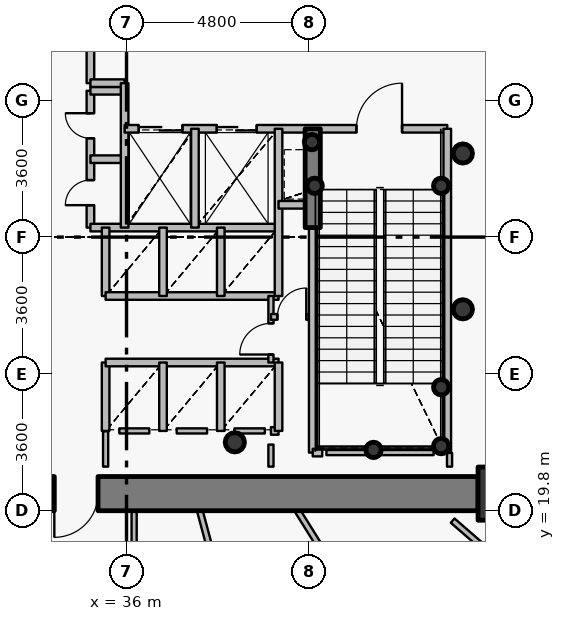
"""IFC4 building model, lengths in metres.
Left out: names, types, materials, properties, quantities, classifications, styles, units other than length and angle.
Written with IfcOpenShell. Run it as: python <this file> out.ifc"""

import sys

from ifc_helpers import new_model, si_unit, direction, frame, frame_2d, origin, origin_2d, place, context, subcontext, project, spatial, rectangle, hollow_circle, extrude, source, transform, mapped, element, fill, save


model = new_model("IFC4")
c1 = context("Model", 3, precision=1e-05, world=origin(), true_north=direction((0.0, 1.0)))
c2 = subcontext(c1, "Body", "Model", "MODEL_VIEW")
j1 = project(units=[si_unit("LENGTHUNIT", "METRE"), si_unit("PLANEANGLEUNIT", "RADIAN")], contexts=[c1])
p1 = place(None, origin())
s1 = spatial("IfcSite", under=j1, at=p1, CompositionType="ELEMENT")
p2 = place(p1, origin())
s2 = spatial("IfcBuilding", under=s1, at=p2, CompositionType="ELEMENT")
p3 = place(p2, frame((0.0, 0.0, 27.0)))
s3 = spatial("IfcBuildingStorey", under=s2, at=p3, CompositionType="ELEMENT", Elevation=27.0)
p4 = place(p3, frame((45.95, 20.25, 0.0), z_axis=(0.0, 0.0, 1.0), x_axis=(1.0, 0.0, 0.0)))
e1 = element("IfcColumn", 1, at=p4, inside=s3, PredefinedType="COLUMN", context=c2, shape_type="SweptSolid", body=[
    extrude(rectangle(XDim=1.4, YDim=1.4, at=origin_2d()), origin(), (0.0, 0.0, 1.0), 5.4),
])
p5 = place(p3, frame((38.85, 21.6, 0.0), z_axis=(0.0, 0.0, 1.0), x_axis=(1.0, 0.0, 0.0)))
e2 = element("IfcColumn", 2, at=p5, inside=s3, PredefinedType="COLUMN", context=c2, shape_type="SweptSolid", body=[
    extrude(hollow_circle(Radius=0.254, WallThickness=0.02, at=origin_2d()), origin(), (0.0, 0.0, 1.0), 5.4),
])
for number, where, z_axis, x_axis in (
    (3, (44.28, 21.5, 0.0), (0.0, 0.0, 1.0), (1.0, 0.0, 0.0)),
    (4, (44.28, 23.05, 0.0), (0.0, 0.0, 1.0), (1.0, 0.0, 0.0)),
    (5, (42.5, 21.4, 0.0), (0.0, 0.0, 1.0), (1.0, 0.0, 0.0)),
    (6, (40.95, 28.35, 0.0), (0.0, 0.0, 1.0), (1.0, 0.0, 0.0)),
    (7, (44.28, 28.35, 0.0), (0.0, 0.0, 1.0), (1.0, 0.0, 0.0)),
    (8, (40.88, 29.5, 0.0), (0.0, 0.0, 1.0), (1.0, 0.0, 0.0)),
):
    element("IfcColumn", number, at=place(p3, frame(where, z_axis=z_axis, x_axis=x_axis)), inside=s3, PredefinedType="COLUMN", context=c2, shape_type="SweptSolid", body=[
        extrude(hollow_circle(Radius=0.203, WallThickness=0.016, at=origin_2d()), origin(), (0.0, 0.0, 1.0), 5.4),
    ])
p6 = place(p3, frame((45.25, 20.25, 0.0), z_axis=(0.0, 0.0, 1.0), x_axis=(-1.0, 0.0, 0.0)))
e9 = element("IfcWall", 9, at=p6, inside=s3, PredefinedType="SHEAR", context=c2, shape_type="SweptSolid", body=[
    extrude(rectangle(XDim=18.5, YDim=0.9, at=frame_2d((9.25, 0.0))), origin(), (0.0, 0.0, 1.0), 4.6),
])
p7 = place(p6, frame((10.0, 0.0, 0.0)))
e10 = element("IfcOpeningElement", 10, at=p7, cuts=e9, PredefinedType="OPENING", context=c2, shape_type="SweptSolid", body=[
    extrude(rectangle(XDim=1.15, YDim=2.15, at=origin_2d()), frame((0.575, 0.46, 1.075), z_axis=(0.0, -1.0, 0.0), x_axis=(1.0, 0.0, 0.0)), (0.0, 0.0, 1.0), 0.92),
])
p8 = place(p3, frame((40.9, 27.25, 0.0), z_axis=(0.0, 0.0, 1.0), x_axis=(0.0, 1.0, 0.0)))
e11 = element("IfcWall", 11, at=p8, inside=s3, PredefinedType="SHEAR", context=c2, shape_type="SweptSolid", body=[
    extrude(rectangle(XDim=2.6, YDim=0.4, at=frame_2d((1.3, 0.0))), origin(), (0.0, 0.0, 1.0), 4.75),
])
for number, where, z_axis, x_axis in (
    (12, (44.85, 25.1, 0.0), (0.0, 0.0, 1.0), (1.0, 0.0, 0.0)),
    (13, (44.85, 29.2, 0.0), (0.0, 0.0, 1.0), (1.0, 0.0, 0.0)),
):
    element("IfcColumn", number, at=place(p3, frame(where, z_axis=z_axis, x_axis=x_axis)), inside=s3, PredefinedType="COLUMN", context=c2, shape_type="SweptSolid", body=[
        extrude(hollow_circle(Radius=0.254, WallThickness=0.02, at=origin_2d()), origin(), (0.0, 0.0, 1.0), 5.4),
    ])
p9 = place(p3, frame((35.05, 27.25, 0.0), z_axis=(0.0, 0.0, 1.0), x_axis=(0.0, 1.0, 0.0)))
e14 = element("IfcWall", 14, at=p9, inside=s3, PredefinedType="PARTITIONING", context=c2, shape_type="SweptSolid", body=[
    extrude(rectangle(XDim=3.6, YDim=0.2, at=frame_2d((1.8, 0.0))), origin(), (0.0, 0.0, 1.0), 5.15),
])
p10 = place(p9, frame((0.59, 0.0, 0.0)))
e15 = element("IfcOpeningElement", 15, at=p10, cuts=e14, PredefinedType="OPENING", context=c2, shape_type="SweptSolid", body=[
    extrude(rectangle(XDim=0.66, YDim=2.05, at=origin_2d()), frame((0.33, 0.11, 1.025), z_axis=(0.0, -1.0, 0.0), x_axis=(1.0, 0.0, 0.0)), (0.0, 0.0, 1.0), 0.22),
])
p11 = place(p9, frame((2.35, 0.0, 0.0)))
e16 = element("IfcOpeningElement", 16, at=p11, cuts=e14, PredefinedType="OPENING", context=c2, shape_type="SweptSolid", body=[
    extrude(rectangle(XDim=0.66, YDim=2.05, at=origin_2d()), frame((0.33, 0.11, 1.025), z_axis=(0.0, -1.0, 0.0), x_axis=(1.0, 0.0, 0.0)), (0.0, 0.0, 1.0), 0.22),
])
p12 = place(p3, frame((35.05, 27.25, 0.0), z_axis=(0.0, 0.0, 1.0), x_axis=(1.0, 0.0, 0.0)))
e17 = element("IfcWall", 17, at=p12, inside=s3, PredefinedType="PARTITIONING", context=c2, shape_type="SweptSolid", body=[
    extrude(rectangle(XDim=4.95, YDim=0.2, at=frame_2d((2.475, 0.0))), origin(), (0.0, 0.0, 1.0), 4.735),
])
for number, where, z_axis, x_axis in (
    (18, (35.05, 29.05, 0.0), (0.0, 0.0, 1.0), (1.0, 0.0, 0.0)),
    (19, (35.05, 30.85, 0.0), (0.0, 0.0, 1.0), (1.0, 0.0, 0.0)),
):
    element("IfcWall", number, at=place(p3, frame(where, z_axis=z_axis, x_axis=x_axis)), inside=s3, PredefinedType="PARTITIONING", context=c2, shape_type="SweptSolid", body=[
        extrude(rectangle(XDim=0.9, YDim=0.2, at=frame_2d((0.45, 0.0))), origin(), (0.0, 0.0, 1.0), 5.15),
    ])
p13 = place(p3, frame((35.05, 31.05, 0.0), z_axis=(0.0, 0.0, 1.0), x_axis=(0.0, 1.0, 0.0)))
e20 = element("IfcWall", 20, at=p13, inside=s3, PredefinedType="PARTITIONING", context=c2, shape_type="SweptSolid", body=[
    extrude(rectangle(XDim=2.25, YDim=0.2, at=frame_2d((1.125, 0.0))), origin(), (0.0, 0.0, 1.0), 4.735),
])
p14 = place(p3, frame((35.05, 31.05, 0.0), z_axis=(0.0, 0.0, 1.0), x_axis=(1.0, 0.0, 0.0)))
e21 = element("IfcWall", 21, at=p14, inside=s3, PredefinedType="PARTITIONING", context=c2, shape_type="SweptSolid", body=[
    extrude(rectangle(XDim=0.9, YDim=0.2, at=frame_2d((0.45, 0.0))), origin(), (0.0, 0.0, 1.0), 5.15),
])
p15 = place(p3, frame((35.45, 21.9, 0.0), z_axis=(0.0, 0.0, 1.0), x_axis=(0.0, 1.0, 0.0)))
e22 = element("IfcWall", 22, at=p15, inside=s3, PredefinedType="PARTITIONING", context=c2, shape_type="SweptSolid", body=[
    extrude(rectangle(XDim=1.8, YDim=0.2, at=frame_2d((0.9, 0.0))), origin(), (0.0, 0.0, 1.0), 5.15),
])
p16 = place(p3, frame((35.45, 23.7, 0.0), z_axis=(0.0, 0.0, 1.0), x_axis=(1.0, 0.0, 0.0)))
e23 = element("IfcWall", 23, at=p16, inside=s3, PredefinedType="PARTITIONING", context=c2, shape_type="SweptSolid", body=[
    extrude(rectangle(XDim=4.55, YDim=0.2, at=frame_2d((2.275, 0.0))), origin(), (0.0, 0.0, 1.0), 4.735),
])
p17 = place(p3, frame((35.45, 25.45, 0.0), z_axis=(0.0, 0.0, 1.0), x_axis=(0.0, 1.0, 0.0)))
e24 = element("IfcWall", 24, at=p17, inside=s3, PredefinedType="PARTITIONING", context=c2, shape_type="SweptSolid", body=[
    extrude(rectangle(XDim=1.8, YDim=0.2, at=frame_2d((0.9, 0.0))), origin(), (0.0, 0.0, 1.0), 5.15),
])
p18 = place(p3, frame((35.45, 25.45, 0.0), z_axis=(0.0, 0.0, 1.0), x_axis=(1.0, 0.0, 0.0)))
e25 = element("IfcWall", 25, at=p18, inside=s3, PredefinedType="PARTITIONING", context=c2, shape_type="SweptSolid", body=[
    extrude(rectangle(XDim=4.55, YDim=0.2, at=frame_2d((2.275, 0.0))), origin(), (0.0, 0.0, 1.0), 4.735),
])
p19 = place(p3, frame((35.95, 27.25, 0.0), z_axis=(0.0, 0.0, 1.0), x_axis=(0.0, 1.0, 0.0)))
e26 = element("IfcWall", 26, at=p19, inside=s3, PredefinedType="PARTITIONING", context=c2, shape_type="SweptSolid", body=[
    extrude(rectangle(XDim=3.8, YDim=0.2, at=frame_2d((1.9, 0.0))), origin(), (0.0, 0.0, 1.0), 5.15),
])
p20 = place(p3, frame((35.95, 29.85, 0.0), z_axis=(0.0, 0.0, 1.0), x_axis=(1.0, 0.0, 0.0)))
e27 = element("IfcWall", 27, at=p20, inside=s3, PredefinedType="PARTITIONING", context=c2, shape_type="SweptSolid", body=[
    extrude(rectangle(XDim=8.49, YDim=0.2, at=frame_2d((4.245, 0.0))), origin(), (0.0, 0.0, 1.0), 4.735),
])
p21 = place(p20, frame((6.1, 0.0, 0.0)))
e28 = element("IfcOpeningElement", 28, at=p21, cuts=e27, PredefinedType="OPENING", context=c2, shape_type="SweptSolid", body=[
    extrude(rectangle(XDim=1.2, YDim=2.15, at=origin_2d()), frame((0.6, 0.11, 1.075), z_axis=(0.0, -1.0, 0.0), x_axis=(1.0, 0.0, 0.0)), (0.0, 0.0, 1.0), 0.22),
])
p22 = place(p20, frame((0.37, 0.0, 0.0)))
e29 = element("IfcOpeningElement", 29, at=p22, cuts=e27, PredefinedType="OPENING", context=c2, shape_type="SweptSolid", body=[
    extrude(rectangle(XDim=1.15, YDim=2.15, at=origin_2d()), frame((0.575, 0.11, 1.075), z_axis=(0.0, -1.0, 0.0), x_axis=(1.0, 0.0, 0.0)), (0.0, 0.0, 1.0), 0.22),
])
p23 = place(p20, frame((2.425, 0.0, 0.0)))
e30 = element("IfcOpeningElement", 30, at=p23, cuts=e27, PredefinedType="OPENING", context=c2, shape_type="SweptSolid", body=[
    extrude(rectangle(XDim=1.05, YDim=2.15, at=origin_2d()), frame((0.525, 0.11, 1.075), z_axis=(0.0, -1.0, 0.0), x_axis=(1.0, 0.0, 0.0)), (0.0, 0.0, 1.0), 0.22),
])
p24 = place(p3, frame((36.2, 17.9, 0.0), z_axis=(0.0, 0.0, 1.0), x_axis=(0.0, 1.0, 0.0)))
e31 = element("IfcWall", 31, at=p24, inside=s3, PredefinedType="PARTITIONING", context=c2, shape_type="SweptSolid", body=[
    extrude(rectangle(XDim=1.9, YDim=0.135, at=frame_2d((0.95, 0.0))), origin(), (0.0, 0.0, 1.0), 3.185),
])
for number, where, z_axis, x_axis in (
    (32, (36.96, 21.9, 0.0), (0.0, 0.0, 1.0), (0.0, 1.0, 0.0)),
    (33, (36.96, 25.45, 0.0), (0.0, 0.0, 1.0), (0.0, 1.0, 0.0)),
):
    element("IfcWall", number, at=place(p3, frame(where, z_axis=z_axis, x_axis=x_axis)), inside=s3, PredefinedType="PARTITIONING", context=c2, shape_type="SweptSolid", body=[
        extrude(rectangle(XDim=1.8, YDim=0.2, at=frame_2d((0.9, 0.0))), origin(), (0.0, 0.0, 1.0), 5.15),
    ])
p25 = place(p3, frame((37.8, 27.25, 0.0), z_axis=(0.0, 0.0, 1.0), x_axis=(0.0, 1.0, 0.0)))
e34 = element("IfcWall", 34, at=p25, inside=s3, PredefinedType="PARTITIONING", context=c2, shape_type="SweptSolid", body=[
    extrude(rectangle(XDim=2.6, YDim=0.2, at=frame_2d((1.3, 0.0))), origin(), (0.0, 0.0, 1.0), 5.15),
])
p26 = place(p3, frame((37.929, 19.8, 0.0), z_axis=(0.0, 0.0, 1.0), x_axis=(0.258828999451, -0.965923158974, 0.0)))
e35 = element("IfcWall", 35, at=p26, inside=s3, PredefinedType="PARTITIONING", context=c2, shape_type="SweptSolid", body=[
    extrude(rectangle(XDim=11.645, YDim=0.15, at=frame_2d((5.823, 0.0))), origin(), (0.0, 0.0, 1.0), 4.635),
])
p27 = place(p26, frame((2.36, 0.0, 0.0)))
e36 = element("IfcOpeningElement", 36, at=p27, cuts=e35, PredefinedType="OPENING", context=c2, shape_type="SweptSolid", body=[
    extrude(rectangle(XDim=0.82, YDim=2.1, at=origin_2d()), frame((0.41, 0.085, 1.05), z_axis=(0.0, -1.0, 0.0), x_axis=(1.0, 0.0, 0.0)), (0.0, 0.0, 1.0), 0.17),
])
p28 = place(p26, frame((8.028, 0.0, 0.0)))
e37 = element("IfcOpeningElement", 37, at=p28, cuts=e35, PredefinedType="OPENING", context=c2, shape_type="SweptSolid", body=[
    extrude(rectangle(XDim=1.05, YDim=2.15, at=origin_2d()), frame((0.525, 0.085, 1.075), z_axis=(0.0, -1.0, 0.0), x_axis=(1.0, 0.0, 0.0)), (0.0, 0.0, 1.0), 0.17),
])
for number, where, z_axis, x_axis in (
    (38, (38.48, 21.9, 0.0), (0.0, 0.0, 1.0), (0.0, 1.0, 0.0)),
    (39, (38.48, 25.45, 0.0), (0.0, 0.0, 1.0), (0.0, 1.0, 0.0)),
):
    element("IfcWall", number, at=place(p3, frame(where, z_axis=z_axis, x_axis=x_axis)), inside=s3, PredefinedType="PARTITIONING", context=c2, shape_type="SweptSolid", body=[
        extrude(rectangle(XDim=1.8, YDim=0.2, at=frame_2d((0.9, 0.0))), origin(), (0.0, 0.0, 1.0), 5.15),
    ])
p29 = place(p3, frame((39.8, 21.9, 0.0), z_axis=(0.0, 0.0, 1.0), x_axis=(1.0, 0.0, 0.0)))
e40 = element("IfcWall", 40, at=p29, inside=s3, PredefinedType="PARTITIONING", context=c2, shape_type="SweptSolid", body=[
    extrude(rectangle(XDim=0.2, YDim=0.2, at=frame_2d((0.1, 0.0))), origin(), (0.0, 0.0, 1.0), 5.15),
])
p30 = place(p3, frame((39.8, 23.7, 0.0), z_axis=(0.0, 0.0, 1.0), x_axis=(0.0, 1.0, 0.0)))
e41 = element("IfcWall", 41, at=p30, inside=s3, PredefinedType="PARTITIONING", context=c2, shape_type="SweptSolid", body=[
    extrude(rectangle(XDim=1.75, YDim=0.135, at=frame_2d((0.875, 0.0))), origin(), (0.0, 0.0, 1.0), 5.15),
])
p31 = place(p30, frame((0.21, 0.0, 0.0)))
e42 = element("IfcOpeningElement", 42, at=p31, cuts=e41, PredefinedType="OPENING", context=c2, shape_type="SweptSolid", body=[
    extrude(rectangle(XDim=0.82, YDim=2.1, at=origin_2d()), frame((0.41, 0.078, 1.05), z_axis=(0.0, -1.0, 0.0), x_axis=(1.0, 0.0, 0.0)), (0.0, 0.0, 1.0), 0.155),
])
p32 = place(p3, frame((39.8, 24.9, 0.0), z_axis=(0.0, 0.0, 1.0), x_axis=(1.0, 0.0, 0.0)))
e43 = element("IfcWall", 43, at=p32, inside=s3, PredefinedType="PARTITIONING", context=c2, shape_type="SweptSolid", body=[
    extrude(rectangle(XDim=1.1, YDim=0.15, at=frame_2d((0.55, 0.0))), origin(), (0.0, 0.0, 1.0), 5.15),
])
p33 = place(p32, frame((0.17, 0.0, 0.0)))
e44 = element("IfcOpeningElement", 44, at=p33, cuts=e43, PredefinedType="OPENING", context=c2, shape_type="SweptSolid", body=[
    extrude(rectangle(XDim=0.76, YDim=2.1, at=origin_2d()), frame((0.38, 0.085, 1.05), z_axis=(0.0, -1.0, 0.0), x_axis=(1.0, 0.0, 0.0)), (0.0, 0.0, 1.0), 0.17),
])
p34 = place(p3, frame((40.0, 21.9, 0.0), z_axis=(0.0, 0.0, 1.0), x_axis=(0.0, 1.0, 0.0)))
e45 = element("IfcWall", 45, at=p34, inside=s3, PredefinedType="PARTITIONING", context=c2, shape_type="SweptSolid", body=[
    extrude(rectangle(XDim=1.8, YDim=0.2, at=frame_2d((0.9, 0.0))), origin(), (0.0, 0.0, 1.0), 5.15),
])
p35 = place(p3, frame((40.0, 25.45, 0.0), z_axis=(0.0, 0.0, 1.0), x_axis=(0.0, 1.0, 0.0)))
e46 = element("IfcWall", 46, at=p35, inside=s3, PredefinedType="PARTITIONING", context=c2, shape_type="SweptSolid", body=[
    extrude(rectangle(XDim=4.4, YDim=0.2, at=frame_2d((2.2, 0.0))), origin(), (0.0, 0.0, 1.0), 5.15),
])
p36 = place(p3, frame((40.0, 27.85, 0.0), z_axis=(0.0, 0.0, 1.0), x_axis=(1.0, 0.0, 0.0)))
e47 = element("IfcWall", 47, at=p36, inside=s3, PredefinedType="PARTITIONING", context=c2, shape_type="SweptSolid", body=[
    extrude(rectangle(XDim=0.9, YDim=0.2, at=frame_2d((0.45, 0.0))), origin(), (0.0, 0.0, 1.0), 5.15),
])
p37 = place(p3, frame((40.499, 19.8, 0.0), z_axis=(0.0, 0.0, 1.0), x_axis=(0.529917315657, -0.848049313759, 0.0)))
e48 = element("IfcWall", 48, at=p37, inside=s3, PredefinedType="PARTITIONING", context=c2, shape_type="SweptSolid", body=[
    extrude(rectangle(XDim=11.561, YDim=0.15, at=frame_2d((5.781, 0.0))), origin(), (0.0, 0.0, 1.0), 5.15),
])
p38 = place(p3, frame((40.9, 21.33, 0.0), z_axis=(0.0, 0.0, 1.0), x_axis=(0.0, 1.0, 0.0)))
e49 = element("IfcWall", 49, at=p38, inside=s3, PredefinedType="PARTITIONING", context=c2, shape_type="SweptSolid", body=[
    extrude(rectangle(XDim=5.91, YDim=0.2, at=frame_2d((2.955, 0.0))), origin(), (0.0, 0.0, 1.0), 4.685),
])
p39 = place(p3, frame((40.9, 21.33, 0.0), z_axis=(0.0, 0.0, 1.0), x_axis=(1.0, 0.0, 0.0)))
e50 = element("IfcWall", 50, at=p39, inside=s3, PredefinedType="PARTITIONING", context=c2, shape_type="SweptSolid", body=[
    extrude(rectangle(XDim=0.25, YDim=0.2, at=frame_2d((0.125, 0.0))), origin(), (0.0, 0.0, 1.0), 4.685),
])
p40 = place(p3, frame((44.44, 21.33, 0.0), z_axis=(0.0, 0.0, 1.0), x_axis=(0.0, 1.0, 0.0)))
e51 = element("IfcWall", 51, at=p40, inside=s3, PredefinedType="PARTITIONING", context=c2, shape_type="SweptSolid", body=[
    extrude(rectangle(XDim=8.52, YDim=0.2, at=frame_2d((4.26, 0.0))), origin(), (0.0, 0.0, 1.0), 5.15),
])
p41 = place(p3, frame((44.08, 21.33, 0.0), z_axis=(0.0, 0.0, 1.0), x_axis=(-1.0, 0.0, 0.0)))
e52 = element("IfcWall", 52, at=p41, inside=s3, PredefinedType="PARTITIONING", context=c2, shape_type="SweptSolid", body=[
    extrude(rectangle(XDim=2.82, YDim=0.135, at=frame_2d((1.41, 0.0))), origin(), (0.0, 0.0, 1.0), 4.685),
])
p42 = place(p3, frame((36.6, 21.9, 0.0), z_axis=(0.0, 0.0, 1.0), x_axis=(-1.0, 0.0, 0.0)))
e53 = element("IfcWall", 53, at=p42, inside=s3, PredefinedType="PARTITIONING", context=c2, shape_type="SweptSolid", body=[
    extrude(rectangle(XDim=0.79, YDim=0.135, at=frame_2d((0.395, 0.0))), origin(), (0.0, 0.0, 1.0), 5.15),
])
p43 = place(p3, frame((38.12, 21.9, 0.0), z_axis=(0.0, 0.0, 1.0), x_axis=(-1.0, 0.0, 0.0)))
e54 = element("IfcWall", 54, at=p43, inside=s3, PredefinedType="PARTITIONING", context=c2, shape_type="SweptSolid", body=[
    extrude(rectangle(XDim=0.8, YDim=0.135, at=frame_2d((0.4, 0.0))), origin(), (0.0, 0.0, 1.0), 5.15),
])
p44 = place(p3, frame((39.64, 21.9, 0.0), z_axis=(0.0, 0.0, 1.0), x_axis=(-1.0, 0.0, 0.0)))
e55 = element("IfcWall", 55, at=p44, inside=s3, PredefinedType="PARTITIONING", context=c2, shape_type="SweptSolid", body=[
    extrude(rectangle(XDim=0.8, YDim=0.135, at=frame_2d((0.4, 0.0))), origin(), (0.0, 0.0, 1.0), 4.735),
])
p45 = place(p3, frame((39.8, 20.96, 0.0), z_axis=(0.0, 0.0, 1.0), x_axis=(0.0, 1.0, 0.0)))
e56 = element("IfcWall", 56, at=p45, inside=s3, PredefinedType="PARTITIONING", context=c2, shape_type="SweptSolid", body=[
    extrude(rectangle(XDim=0.58, YDim=0.135, at=frame_2d((0.29, 0.0))), origin(), (0.0, 0.0, 1.0), 4.685),
])
p46 = place(p3, frame((44.5, 20.96, 0.0), z_axis=(0.0, 0.0, 1.0), x_axis=(0.0, 1.0, 0.0)))
e57 = element("IfcWall", 57, at=p46, inside=s3, PredefinedType="PARTITIONING", context=c2, shape_type="SweptSolid", body=[
    extrude(rectangle(XDim=0.36, YDim=0.135, at=frame_2d((0.18, 0.0))), origin(), (0.0, 0.0, 1.0), 5.15),
])
p47 = place(p3, frame((35.45, 21.89, 0.0), z_axis=(0.0, 0.0, 1.0), x_axis=(0.0, -1.0, 0.0)))
e58 = element("IfcWall", 58, at=p47, inside=s3, PredefinedType="PARTITIONING", context=c2, shape_type="SweptSolid", body=[
    extrude(rectangle(XDim=0.93, YDim=0.135, at=frame_2d((0.465, 0.0))), origin(), (0.0, 0.0, 1.0), 4.735),
])
p48 = place(p3, frame((44.582, 19.54, 0.0), z_axis=(0.0, 0.0, 1.0), x_axis=(0.754677286449, -0.656096176881, 0.0)))
e59 = element("IfcWall", 59, at=p48, inside=s3, PredefinedType="PARTITIONING", context=c2, shape_type="SweptSolid", body=[
    extrude(rectangle(XDim=1.538, YDim=0.15, at=frame_2d((0.769, 0.0))), origin(), (0.0, 0.0, 1.0), 5.15),
])
m1 = source(origin(), c2, "Body", "SweptSolid", [
    extrude(rectangle(XDim=1.15, YDim=2.15, at=origin_2d()), frame((0.575, 0.025, 1.075), z_axis=(0.0, -1.0, 0.0), x_axis=(1.0, 0.0, 0.0)), (0.0, 0.0, 1.0), 0.05),
])
p49 = place(p7, origin())
e60 = element("IfcDoor", 60, at=p49, inside=s3, OperationType="SINGLE_SWING_RIGHT", PredefinedType="DOOR", context=c2, shape_type="MappedRepresentation", body=[
    mapped(m1, transform((0.0, 0.0, 0.0), x_axis=(1.0, 0.0, 0.0), y_axis=(0.0, 1.0, 0.0), z_axis=(0.0, 0.0, 1.0), scale=1.0)),
])
fill(e10, e60)
m2 = source(origin(), c2, "Body", "SweptSolid", [
    extrude(rectangle(XDim=1.2, YDim=2.15, at=origin_2d()), frame((0.6, 0.025, 1.075), z_axis=(0.0, -1.0, 0.0), x_axis=(1.0, 0.0, 0.0)), (0.0, 0.0, 1.0), 0.05),
])
p50 = place(p21, origin())
e61 = element("IfcDoor", 61, at=p50, inside=s3, OperationType="SINGLE_SWING_RIGHT", PredefinedType="DOOR", context=c2, shape_type="MappedRepresentation", body=[
    mapped(m2, transform((0.0, 0.0, 0.0), x_axis=(1.0, 0.0, 0.0), y_axis=(0.0, 1.0, 0.0), z_axis=(0.0, 0.0, 1.0), scale=1.0)),
])
fill(e28, e61)
m3 = source(origin(), c2, "Body", "SweptSolid", [
    extrude(rectangle(XDim=1.15, YDim=2.15, at=origin_2d()), frame((0.575, 0.025, 1.075), z_axis=(0.0, -1.0, 0.0), x_axis=(1.0, 0.0, 0.0)), (0.0, 0.0, 1.0), 0.05),
])
p51 = place(p22, origin())
e62 = element("IfcDoor", 62, at=p51, inside=s3, OperationType="DOUBLE_DOOR_SLIDING", PredefinedType="USERDEFINED", context=c2, shape_type="MappedRepresentation", body=[
    mapped(m3, transform((0.0, 0.0, 0.0), x_axis=(1.0, 0.0, 0.0), y_axis=(0.0, 1.0, 0.0), z_axis=(0.0, 0.0, 1.0), scale=1.0)),
])
fill(e29, e62)
m4 = source(origin(), c2, "Body", "SweptSolid", [
    extrude(rectangle(XDim=1.05, YDim=2.15, at=origin_2d()), frame((0.525, 0.025, 1.075), z_axis=(0.0, -1.0, 0.0), x_axis=(1.0, 0.0, 0.0)), (0.0, 0.0, 1.0), 0.05),
])
p52 = place(p23, origin())
e63 = element("IfcDoor", 63, at=p52, inside=s3, OperationType="DOUBLE_DOOR_SLIDING", PredefinedType="USERDEFINED", context=c2, shape_type="MappedRepresentation", body=[
    mapped(m4, transform((0.0, 0.0, 0.0), x_axis=(1.0, 0.0, 0.0), y_axis=(0.0, 1.0, 0.0), z_axis=(0.0, 0.0, 1.0), scale=1.0)),
])
fill(e30, e63)
m5 = source(origin(), c2, "Body", "SweptSolid", [
    extrude(rectangle(XDim=0.66, YDim=2.05, at=origin_2d()), frame((0.33, 0.025, 1.025), z_axis=(0.0, -1.0, 0.0), x_axis=(1.0, 0.0, 0.0)), (0.0, 0.0, 1.0), 0.05),
])
p53 = place(p10, origin())
e64 = element("IfcDoor", 64, at=p53, inside=s3, OperationType="SINGLE_SWING_LEFT", PredefinedType="USERDEFINED", context=c2, shape_type="MappedRepresentation", body=[
    mapped(m5, transform((0.0, 0.0, 0.0), x_axis=(1.0, 0.0, 0.0), y_axis=(0.0, 1.0, 0.0), z_axis=(0.0, 0.0, 1.0), scale=1.0)),
])
fill(e15, e64)
p54 = place(p11, origin())
e65 = element("IfcDoor", 65, at=p54, inside=s3, OperationType="SINGLE_SWING_RIGHT", PredefinedType="USERDEFINED", context=c2, shape_type="MappedRepresentation", body=[
    mapped(m5, transform((0.0, 0.0, 0.0), x_axis=(1.0, 0.0, 0.0), y_axis=(0.0, 1.0, 0.0), z_axis=(0.0, 0.0, 1.0), scale=1.0)),
])
fill(e16, e65)
m6 = source(origin(), c2, "Body", "SweptSolid", [
    extrude(rectangle(XDim=0.82, YDim=2.1, at=origin_2d()), frame((0.41, 0.025, 1.05), z_axis=(0.0, -1.0, 0.0), x_axis=(1.0, 0.0, 0.0)), (0.0, 0.0, 1.0), 0.05),
])
p55 = place(p31, origin())
e66 = element("IfcDoor", 66, at=p55, inside=s3, OperationType="SINGLE_SWING_LEFT", PredefinedType="DOOR", context=c2, shape_type="MappedRepresentation", body=[
    mapped(m6, transform((0.0, 0.0, 0.0), x_axis=(1.0, 0.0, 0.0), y_axis=(0.0, 1.0, 0.0), z_axis=(0.0, 0.0, 1.0), scale=1.0)),
])
fill(e42, e66)
m7 = source(origin(), c2, "Body", "SweptSolid", [
    extrude(rectangle(XDim=0.76, YDim=2.1, at=origin_2d()), frame((0.38, 0.025, 1.05), z_axis=(0.0, -1.0, 0.0), x_axis=(1.0, 0.0, 0.0)), (0.0, 0.0, 1.0), 0.05),
])
p56 = place(p33, origin())
e67 = element("IfcDoor", 67, at=p56, inside=s3, OperationType="SINGLE_SWING_RIGHT", PredefinedType="DOOR", context=c2, shape_type="MappedRepresentation", body=[
    mapped(m7, transform((0.0, 0.0, 0.0), x_axis=(1.0, 0.0, 0.0), y_axis=(0.0, 1.0, 0.0), z_axis=(0.0, 0.0, 1.0), scale=1.0)),
])
fill(e44, e67)
save(model, sys.argv[1])
